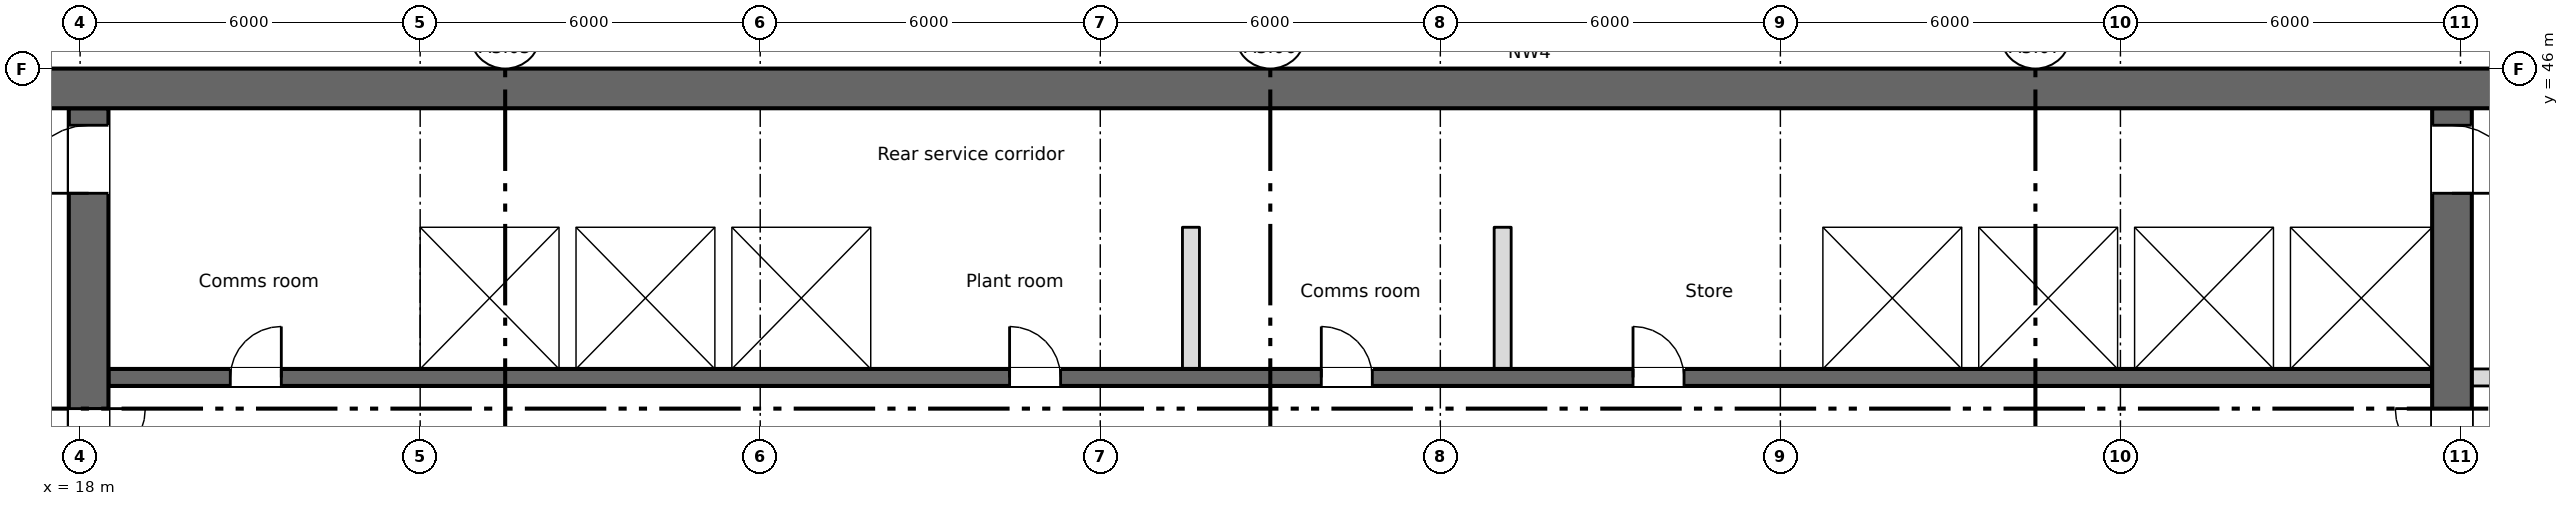
"""IFC4 building model, lengths in metres.
Left out: names, types, materials, properties, quantities, classifications, styles, units other than length and angle.
Written with IfcOpenShell. Run it as: python <this file> out.ifc"""

import sys

from ifc_helpers import new_model, si_unit, direction, frame, frame_2d, origin, place, context, subcontext, project, spatial, rectangle, extrude, element, fill, save


model = new_model("IFC4")
c1 = context("Model", 3, precision=1e-05, world=origin(), true_north=direction((0.0, 1.0)))
c2 = subcontext(c1, "Body", "Model", "MODEL_VIEW")
j1 = project(units=[si_unit("LENGTHUNIT", "METRE"), si_unit("PLANEANGLEUNIT", "RADIAN")], contexts=[c1])
p1 = place(None, origin())
s1 = spatial("IfcSite", under=j1, at=p1, CompositionType="ELEMENT")
p2 = place(p1, origin())
s2 = spatial("IfcBuilding", under=s1, at=p2, CompositionType="ELEMENT")
p3 = place(p2, frame((0.0, 0.0, 189.25)))
s3 = spatial("IfcBuildingStorey", under=s2, at=p3, CompositionType="ELEMENT", Elevation=189.25)
p4 = place(p3, frame((11.55, 45.65, 0.0), z_axis=(0.0, 0.0, 1.0), x_axis=(1.0, 0.0, 0.0)))
e1 = element("IfcWall", 1, at=p4, inside=s3, PredefinedType="SHEAR", context=c2, shape_type="SweptSolid", body=[
    extrude(rectangle(XDim=54.9, YDim=0.7, at=frame_2d((27.45, 0.0))), origin(), (0.0, 0.0, 1.0), 3.35),
])
p5 = place(p4, frame((1.2, 0.0, 0.6)))
e2 = element("IfcOpeningElement", 2, at=p5, cuts=e1, PredefinedType="OPENING", context=c2, shape_type="SweptSolid", body=[
    extrude(rectangle(XDim=0.6, YDim=2.4, at=frame_2d((0.3, 1.2))), frame((0.0, 0.36, 0.0), z_axis=(0.0, -1.0, 0.0), x_axis=(1.0, 0.0, 0.0)), (0.0, 0.0, 1.0), 0.72),
])
p6 = place(p4, frame((49.2, 0.0, 0.6)))
e3 = element("IfcOpeningElement", 3, at=p6, cuts=e1, PredefinedType="OPENING", context=c2, shape_type="SweptSolid", body=[
    extrude(rectangle(XDim=0.6, YDim=2.4, at=frame_2d((0.3, 1.2))), frame((0.0, 0.36, 0.0), z_axis=(0.0, -1.0, 0.0), x_axis=(1.0, 0.0, 0.0)), (0.0, 0.0, 1.0), 0.72),
])
p7 = place(p3, frame((18.15, 28.4, 0.0), z_axis=(0.0, 0.0, 1.0), x_axis=(0.0, 1.0, 0.0)))
e4 = element("IfcWall", 4, at=p7, inside=s3, PredefinedType="SHEAR", context=c2, shape_type="SweptSolid", body=[
    extrude(rectangle(XDim=16.9, YDim=0.7, at=frame_2d((8.45, 0.0))), origin(), (0.0, 0.0, 1.0), 3.35),
])
p8 = place(p7, frame((9.6, 0.0, 0.0)))
e5 = element("IfcOpeningElement", 5, at=p8, cuts=e4, PredefinedType="OPENING", context=c2, shape_type="SweptSolid", body=[
    extrude(rectangle(XDim=2.0, YDim=2.1, at=frame_2d((1.0, 1.05))), frame((0.0, 0.36, 0.0), z_axis=(0.0, -1.0, 0.0), x_axis=(1.0, 0.0, 0.0)), (0.0, 0.0, 1.0), 0.72),
])
p9 = place(p7, frame((15.4, 0.0, 0.0)))
e6 = element("IfcOpeningElement", 6, at=p9, cuts=e4, PredefinedType="OPENING", context=c2, shape_type="SweptSolid", body=[
    extrude(rectangle(XDim=1.2, YDim=2.1, at=frame_2d((0.6, 1.05))), frame((0.0, 0.36, 0.0), z_axis=(0.0, -1.0, 0.0), x_axis=(1.0, 0.0, 0.0)), (0.0, 0.0, 1.0), 0.72),
])
p10 = place(p3, frame((59.85, 28.4, 0.0), z_axis=(0.0, 0.0, 1.0), x_axis=(0.0, 1.0, 0.0)))
e7 = element("IfcWall", 7, at=p10, inside=s3, PredefinedType="SHEAR", context=c2, shape_type="SweptSolid", body=[
    extrude(rectangle(XDim=16.9, YDim=0.7, at=frame_2d((8.45, 0.0))), origin(), (0.0, 0.0, 1.0), 3.35),
])
p11 = place(p10, frame((9.6, 0.0, 0.0)))
e8 = element("IfcOpeningElement", 8, at=p11, cuts=e7, PredefinedType="OPENING", context=c2, shape_type="SweptSolid", body=[
    extrude(rectangle(XDim=2.0, YDim=2.1, at=frame_2d((1.0, 1.05))), frame((0.0, 0.36, 0.0), z_axis=(0.0, -1.0, 0.0), x_axis=(1.0, 0.0, 0.0)), (0.0, 0.0, 1.0), 0.72),
])
p12 = place(p10, frame((15.4, 0.0, 0.0)))
e9 = element("IfcOpeningElement", 9, at=p12, cuts=e7, PredefinedType="OPENING", context=c2, shape_type="SweptSolid", body=[
    extrude(rectangle(XDim=1.2, YDim=2.1, at=frame_2d((0.6, 1.05))), frame((0.0, 0.36, 0.0), z_axis=(0.0, -1.0, 0.0), x_axis=(1.0, 0.0, 0.0)), (0.0, 0.0, 1.0), 0.72),
])
p13 = place(p3, frame((18.5, 40.55, 0.0), z_axis=(0.0, 0.0, 1.0), x_axis=(1.0, 0.0, 0.0)))
e10 = element("IfcWall", 10, at=p13, inside=s3, PredefinedType="SHEAR", context=c2, shape_type="SweptSolid", body=[
    extrude(rectangle(XDim=41.0, YDim=0.3, at=frame_2d((20.5, 0.0))), origin(), (0.0, 0.0, 1.0), 3.35),
])
p14 = place(p13, frame((2.15, 0.0, 0.0)))
e11 = element("IfcOpeningElement", 11, at=p14, cuts=e10, PredefinedType="OPENING", context=c2, shape_type="SweptSolid", body=[
    extrude(rectangle(XDim=0.9, YDim=2.1, at=frame_2d((0.45, 1.05))), frame((0.0, 0.16, 0.0), z_axis=(0.0, -1.0, 0.0), x_axis=(1.0, 0.0, 0.0)), (0.0, 0.0, 1.0), 0.32),
])
p15 = place(p13, frame((15.9, 0.0, 0.0)))
e12 = element("IfcOpeningElement", 12, at=p15, cuts=e10, PredefinedType="OPENING", context=c2, shape_type="SweptSolid", body=[
    extrude(rectangle(XDim=0.9, YDim=2.1, at=frame_2d((0.45, 1.05))), frame((0.0, 0.16, 0.0), z_axis=(0.0, -1.0, 0.0), x_axis=(1.0, 0.0, 0.0)), (0.0, 0.0, 1.0), 0.32),
])
p16 = place(p13, frame((21.4, 0.0, 0.0)))
e13 = element("IfcOpeningElement", 13, at=p16, cuts=e10, PredefinedType="OPENING", context=c2, shape_type="SweptSolid", body=[
    extrude(rectangle(XDim=0.9, YDim=2.1, at=frame_2d((0.45, 1.05))), frame((0.0, 0.16, 0.0), z_axis=(0.0, -1.0, 0.0), x_axis=(1.0, 0.0, 0.0)), (0.0, 0.0, 1.0), 0.32),
])
p17 = place(p13, frame((26.9, 0.0, 0.0)))
e14 = element("IfcOpeningElement", 14, at=p17, cuts=e10, PredefinedType="OPENING", context=c2, shape_type="SweptSolid", body=[
    extrude(rectangle(XDim=0.9, YDim=2.1, at=frame_2d((0.45, 1.05))), frame((0.0, 0.16, 0.0), z_axis=(0.0, -1.0, 0.0), x_axis=(1.0, 0.0, 0.0)), (0.0, 0.0, 1.0), 0.32),
])
p18 = place(p13, frame((6.175, 0.0, 0.0)))
e15 = element("IfcOpeningElement", 15, at=p18, cuts=e10, PredefinedType="OPENING", context=c2, shape_type="SweptSolid", body=[
    extrude(rectangle(XDim=1.1, YDim=2.1, at=frame_2d((0.55, 1.05))), frame((0.0, 0.16, 0.0), z_axis=(0.0, -1.0, 0.0), x_axis=(1.0, 0.0, 0.0)), (0.0, 0.0, 1.0), 0.32),
])
p19 = place(p13, frame((8.925, 0.0, 0.0)))
e16 = element("IfcOpeningElement", 16, at=p19, cuts=e10, PredefinedType="OPENING", context=c2, shape_type="SweptSolid", body=[
    extrude(rectangle(XDim=1.1, YDim=2.1, at=frame_2d((0.55, 1.05))), frame((0.0, 0.16, 0.0), z_axis=(0.0, -1.0, 0.0), x_axis=(1.0, 0.0, 0.0)), (0.0, 0.0, 1.0), 0.32),
])
p20 = place(p13, frame((11.675, 0.0, 0.0)))
e17 = element("IfcOpeningElement", 17, at=p20, cuts=e10, PredefinedType="OPENING", context=c2, shape_type="SweptSolid", body=[
    extrude(rectangle(XDim=1.1, YDim=2.1, at=frame_2d((0.55, 1.05))), frame((0.0, 0.16, 0.0), z_axis=(0.0, -1.0, 0.0), x_axis=(1.0, 0.0, 0.0)), (0.0, 0.0, 1.0), 0.32),
])
p21 = place(p13, frame((30.925, 0.0, 0.0)))
e18 = element("IfcOpeningElement", 18, at=p21, cuts=e10, PredefinedType="OPENING", context=c2, shape_type="SweptSolid", body=[
    extrude(rectangle(XDim=1.1, YDim=2.1, at=frame_2d((0.55, 1.05))), frame((0.0, 0.16, 0.0), z_axis=(0.0, -1.0, 0.0), x_axis=(1.0, 0.0, 0.0)), (0.0, 0.0, 1.0), 0.32),
])
p22 = place(p13, frame((33.675, 0.0, 0.0)))
e19 = element("IfcOpeningElement", 19, at=p22, cuts=e10, PredefinedType="OPENING", context=c2, shape_type="SweptSolid", body=[
    extrude(rectangle(XDim=1.1, YDim=2.1, at=frame_2d((0.55, 1.05))), frame((0.0, 0.16, 0.0), z_axis=(0.0, -1.0, 0.0), x_axis=(1.0, 0.0, 0.0)), (0.0, 0.0, 1.0), 0.32),
])
p23 = place(p13, frame((36.375, 0.0, 0.0)))
e20 = element("IfcOpeningElement", 20, at=p23, cuts=e10, PredefinedType="OPENING", context=c2, shape_type="SweptSolid", body=[
    extrude(rectangle(XDim=1.2, YDim=2.1, at=frame_2d((0.6, 1.05))), frame((0.0, 0.16, 0.0), z_axis=(0.0, -1.0, 0.0), x_axis=(1.0, 0.0, 0.0)), (0.0, 0.0, 1.0), 0.32),
])
p24 = place(p13, frame((39.15, 0.0, 0.0)))
e21 = element("IfcOpeningElement", 21, at=p24, cuts=e10, PredefinedType="OPENING", context=c2, shape_type="SweptSolid", body=[
    extrude(rectangle(XDim=1.2, YDim=2.1, at=frame_2d((0.6, 1.05))), frame((0.0, 0.16, 0.0), z_axis=(0.0, -1.0, 0.0), x_axis=(1.0, 0.0, 0.0)), (0.0, 0.0, 1.0), 0.32),
])
p25 = place(p3, frame((18.5, 43.35, 0.0), z_axis=(0.0, 0.0, 1.0), x_axis=(1.0, 0.0, 0.0)))
e22 = element("IfcWall", 22, at=p25, inside=s3, PredefinedType="SHEAR", context=c2, shape_type="SweptSolid", body=[
    extrude(rectangle(XDim=41.0, YDim=0.3, at=frame_2d((20.5, 0.0))), origin(), (0.0, 0.0, 1.0), 3.35),
])
p26 = place(p3, frame((60.2, 40.55, 0.0), z_axis=(0.0, 0.0, 1.0), x_axis=(1.0, 0.0, 0.0)))
e23 = element("IfcWall", 23, at=p26, inside=s3, PredefinedType="PARTITIONING", context=c2, shape_type="SweptSolid", body=[
    extrude(rectangle(XDim=2.5, YDim=0.3, at=frame_2d((1.25, 0.0))), origin(), (0.0, 0.0, 1.0), 3.35),
])
p27 = place(p26, frame((0.725, 0.0, 0.0)))
e24 = element("IfcOpeningElement", 24, at=p27, cuts=e23, PredefinedType="OPENING", context=c2, shape_type="SweptSolid", body=[
    extrude(rectangle(XDim=0.9, YDim=2.1, at=frame_2d((0.45, 1.05))), frame((0.0, 0.16, 0.0), z_axis=(0.0, -1.0, 0.0), x_axis=(1.0, 0.0, 0.0)), (0.0, 0.0, 1.0), 0.32),
])
for number, where, z_axis, x_axis in (
    (25, (23.85, 40.7, 0.0), (0.0, 0.0, 1.0), (0.0, 1.0, 0.0)),
    (26, (26.6, 40.7, 0.0), (0.0, 0.0, 1.0), (0.0, 1.0, 0.0)),
    (27, (29.35, 40.7, 0.0), (0.0, 0.0, 1.0), (0.0, 1.0, 0.0)),
    (28, (32.1, 40.7, 0.0), (0.0, 0.0, 1.0), (0.0, 1.0, 0.0)),
    (29, (48.6, 40.7, 0.0), (0.0, 0.0, 1.0), (0.0, 1.0, 0.0)),
    (30, (51.35, 40.7, 0.0), (0.0, 0.0, 1.0), (0.0, 1.0, 0.0)),
    (31, (54.1, 40.7, 0.0), (0.0, 0.0, 1.0), (0.0, 1.0, 0.0)),
    (32, (56.85, 40.7, 0.0), (0.0, 0.0, 1.0), (0.0, 1.0, 0.0)),
):
    element("IfcWall", number, at=place(p3, frame(where, z_axis=z_axis, x_axis=x_axis)), inside=s3, PredefinedType="SHEAR", context=c2, shape_type="SweptSolid", body=[
        extrude(rectangle(XDim=2.5, YDim=0.3, at=frame_2d((1.25, 0.0))), origin(), (0.0, 0.0, 1.0), 3.35),
    ])
for number, where, z_axis, x_axis in (
    (33, (37.6, 40.7, 0.0), (0.0, 0.0, 1.0), (0.0, 1.0, 0.0)),
    (34, (43.1, 40.7, 0.0), (0.0, 0.0, 1.0), (0.0, 1.0, 0.0)),
):
    element("IfcWall", number, at=place(p3, frame(where, z_axis=z_axis, x_axis=x_axis)), inside=s3, PredefinedType="PARTITIONING", context=c2, shape_type="SweptSolid", body=[
        extrude(rectangle(XDim=2.5, YDim=0.3, at=frame_2d((1.25, 0.0))), origin(), (0.0, 0.0, 1.0), 3.35),
    ])
p28 = place(p14, origin())
e35 = element("IfcDoor", 35, at=p28, inside=s3, OperationType="SINGLE_SWING_RIGHT", PredefinedType="DOOR", context=c2, shape_type="SweptSolid", body=[
    extrude(rectangle(XDim=0.9, YDim=2.1, at=frame_2d((0.45, 1.05))), frame((0.0, 0.025, 0.0), z_axis=(0.0, -1.0, 0.0), x_axis=(1.0, 0.0, 0.0)), (0.0, 0.0, 1.0), 0.05),
])
fill(e11, e35)
p29 = place(p15, origin())
e36 = element("IfcDoor", 36, at=p29, inside=s3, OperationType="SINGLE_SWING_LEFT", PredefinedType="DOOR", context=c2, shape_type="SweptSolid", body=[
    extrude(rectangle(XDim=0.9, YDim=2.1, at=frame_2d((0.45, 1.05))), frame((0.0, 0.025, 0.0), z_axis=(0.0, -1.0, 0.0), x_axis=(1.0, 0.0, 0.0)), (0.0, 0.0, 1.0), 0.05),
])
fill(e12, e36)
p30 = place(p16, origin())
e37 = element("IfcDoor", 37, at=p30, inside=s3, OperationType="SINGLE_SWING_LEFT", PredefinedType="DOOR", context=c2, shape_type="SweptSolid", body=[
    extrude(rectangle(XDim=0.9, YDim=2.1, at=frame_2d((0.45, 1.05))), frame((0.0, 0.025, 0.0), z_axis=(0.0, -1.0, 0.0), x_axis=(1.0, 0.0, 0.0)), (0.0, 0.0, 1.0), 0.05),
])
fill(e13, e37)
p31 = place(p17, origin())
e38 = element("IfcDoor", 38, at=p31, inside=s3, OperationType="SINGLE_SWING_LEFT", PredefinedType="DOOR", context=c2, shape_type="SweptSolid", body=[
    extrude(rectangle(XDim=0.9, YDim=2.1, at=frame_2d((0.45, 1.05))), frame((0.0, 0.025, 0.0), z_axis=(0.0, -1.0, 0.0), x_axis=(1.0, 0.0, 0.0)), (0.0, 0.0, 1.0), 0.05),
])
fill(e14, e38)
p32 = place(p18, origin())
e39 = element("IfcDoor", 39, at=p32, inside=s3, OperationType="SLIDING_TO_LEFT", PredefinedType="DOOR", context=c2, shape_type="SweptSolid", body=[
    extrude(rectangle(XDim=1.1, YDim=2.1, at=frame_2d((0.55, 1.05))), frame((0.0, 0.025, 0.0), z_axis=(0.0, -1.0, 0.0), x_axis=(1.0, 0.0, 0.0)), (0.0, 0.0, 1.0), 0.05),
])
fill(e15, e39)
p33 = place(p19, origin())
e40 = element("IfcDoor", 40, at=p33, inside=s3, OperationType="SLIDING_TO_LEFT", PredefinedType="DOOR", context=c2, shape_type="SweptSolid", body=[
    extrude(rectangle(XDim=1.1, YDim=2.1, at=frame_2d((0.55, 1.05))), frame((0.0, 0.025, 0.0), z_axis=(0.0, -1.0, 0.0), x_axis=(1.0, 0.0, 0.0)), (0.0, 0.0, 1.0), 0.05),
])
fill(e16, e40)
p34 = place(p20, origin())
e41 = element("IfcDoor", 41, at=p34, inside=s3, OperationType="SLIDING_TO_LEFT", PredefinedType="DOOR", context=c2, shape_type="SweptSolid", body=[
    extrude(rectangle(XDim=1.1, YDim=2.1, at=frame_2d((0.55, 1.05))), frame((0.0, 0.025, 0.0), z_axis=(0.0, -1.0, 0.0), x_axis=(1.0, 0.0, 0.0)), (0.0, 0.0, 1.0), 0.05),
])
fill(e17, e41)
p35 = place(p21, origin())
e42 = element("IfcDoor", 42, at=p35, inside=s3, OperationType="SLIDING_TO_LEFT", PredefinedType="DOOR", context=c2, shape_type="SweptSolid", body=[
    extrude(rectangle(XDim=1.1, YDim=2.1, at=frame_2d((0.55, 1.05))), frame((0.0, 0.025, 0.0), z_axis=(0.0, -1.0, 0.0), x_axis=(1.0, 0.0, 0.0)), (0.0, 0.0, 1.0), 0.05),
])
fill(e18, e42)
p36 = place(p22, origin())
e43 = element("IfcDoor", 43, at=p36, inside=s3, OperationType="SLIDING_TO_LEFT", PredefinedType="DOOR", context=c2, shape_type="SweptSolid", body=[
    extrude(rectangle(XDim=1.1, YDim=2.1, at=frame_2d((0.55, 1.05))), frame((0.0, 0.025, 0.0), z_axis=(0.0, -1.0, 0.0), x_axis=(1.0, 0.0, 0.0)), (0.0, 0.0, 1.0), 0.05),
])
fill(e19, e43)
p37 = place(p23, origin())
e44 = element("IfcDoor", 44, at=p37, inside=s3, OperationType="SLIDING_TO_LEFT", PredefinedType="DOOR", context=c2, shape_type="SweptSolid", body=[
    extrude(rectangle(XDim=1.2, YDim=2.1, at=frame_2d((0.6, 1.05))), frame((0.0, 0.025, 0.0), z_axis=(0.0, -1.0, 0.0), x_axis=(1.0, 0.0, 0.0)), (0.0, 0.0, 1.0), 0.05),
])
fill(e20, e44)
p38 = place(p24, origin())
e45 = element("IfcDoor", 45, at=p38, inside=s3, OperationType="SLIDING_TO_LEFT", PredefinedType="DOOR", context=c2, shape_type="SweptSolid", body=[
    extrude(rectangle(XDim=1.2, YDim=2.1, at=frame_2d((0.6, 1.05))), frame((0.0, 0.025, 0.0), z_axis=(0.0, -1.0, 0.0), x_axis=(1.0, 0.0, 0.0)), (0.0, 0.0, 1.0), 0.05),
])
fill(e21, e45)
p39 = place(p8, origin())
e46 = element("IfcDoor", 46, at=p39, inside=s3, OperationType="DOUBLE_DOOR_SINGLE_SWING", PredefinedType="DOOR", context=c2, shape_type="SweptSolid", body=[
    extrude(rectangle(XDim=2.0, YDim=2.1, at=frame_2d((1.0, 1.05))), frame((0.0, 0.025, 0.0), z_axis=(0.0, -1.0, 0.0), x_axis=(1.0, 0.0, 0.0)), (0.0, 0.0, 1.0), 0.05),
])
fill(e5, e46)
p40 = place(p11, origin())
e47 = element("IfcDoor", 47, at=p40, inside=s3, OperationType="DOUBLE_DOOR_SINGLE_SWING", PredefinedType="DOOR", context=c2, shape_type="SweptSolid", body=[
    extrude(rectangle(XDim=2.0, YDim=2.1, at=frame_2d((1.0, 1.05))), frame((0.0, 0.025, 0.0), z_axis=(0.0, -1.0, 0.0), x_axis=(1.0, 0.0, 0.0)), (0.0, 0.0, 1.0), 0.05),
])
fill(e8, e47)
p41 = place(p9, origin())
e48 = element("IfcDoor", 48, at=p41, inside=s3, OperationType="SINGLE_SWING_LEFT", PredefinedType="DOOR", context=c2, shape_type="SweptSolid", body=[
    extrude(rectangle(XDim=1.2, YDim=2.1, at=frame_2d((0.6, 1.05))), frame((0.0, 0.025, 0.0), z_axis=(0.0, -1.0, 0.0), x_axis=(1.0, 0.0, 0.0)), (0.0, 0.0, 1.0), 0.05),
])
fill(e6, e48)
p42 = place(p12, origin())
e49 = element("IfcDoor", 49, at=p42, inside=s3, OperationType="SINGLE_SWING_LEFT", PredefinedType="DOOR", context=c2, shape_type="SweptSolid", body=[
    extrude(rectangle(XDim=1.2, YDim=2.1, at=frame_2d((0.6, 1.05))), frame((0.0, 0.025, 0.0), z_axis=(0.0, -1.0, 0.0), x_axis=(1.0, 0.0, 0.0)), (0.0, 0.0, 1.0), 0.05),
])
fill(e9, e49)
save(model, sys.argv[1])
